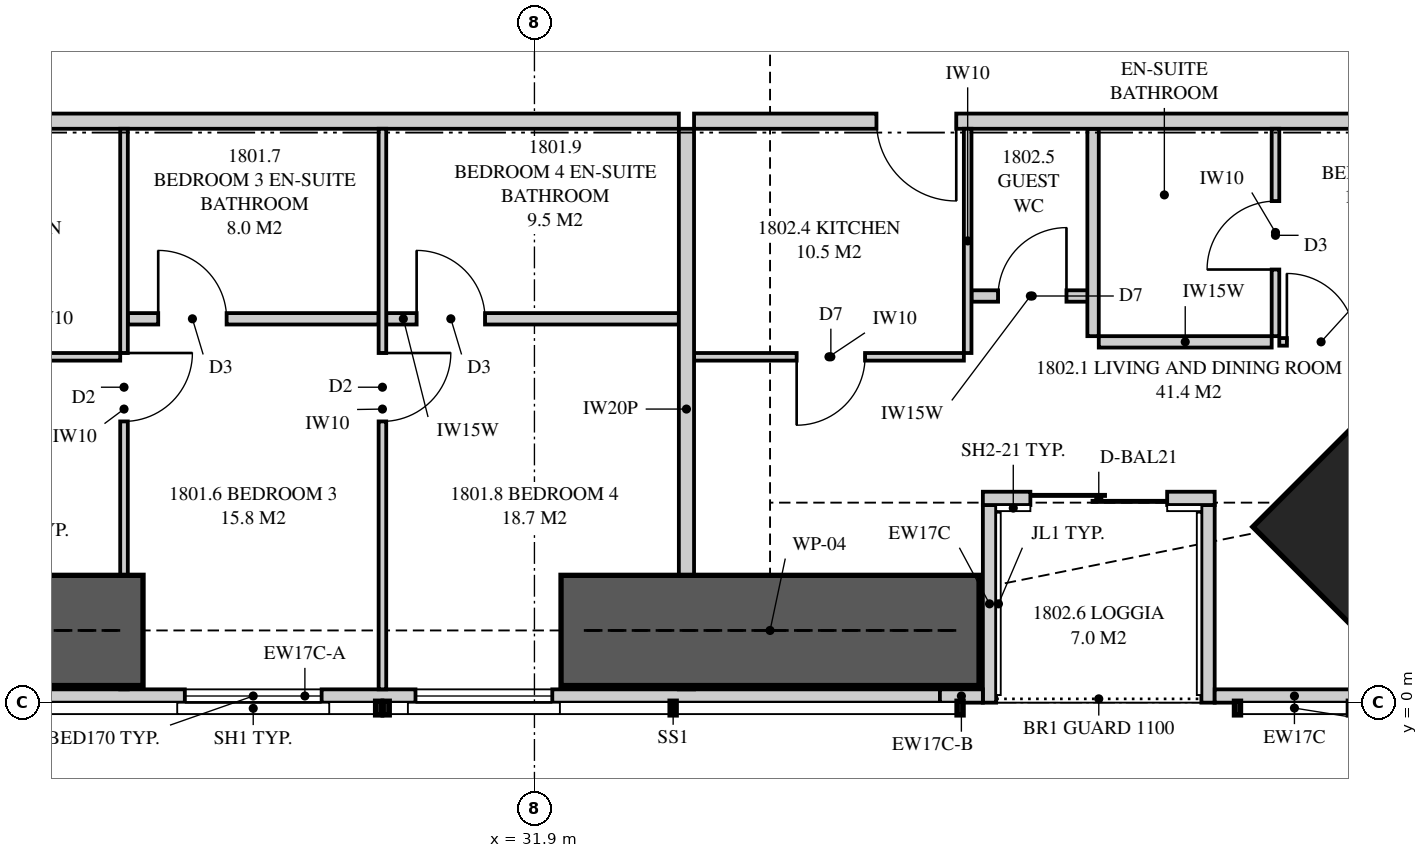
"""IFC4 building model, lengths in metres.
Left out: names, types, materials, properties, quantities, classifications, styles, units other than length and angle.
Written with IfcOpenShell. Run it as: python <this file> out.ifc"""

import sys

from ifc_helpers import new_model, si_unit, direction, frame, frame_2d, origin, origin_2d, place, context, subcontext, project, spatial, polyline, rectangle, hollow_rectangle, outline, extrude, element, fill, save


model = new_model("IFC4")
c1 = context("Model", 3, precision=1e-05, world=origin(), true_north=direction((0.0, 1.0)))
c2 = subcontext(c1, "Body", "Model", "MODEL_VIEW")
j1 = project(units=[si_unit("LENGTHUNIT", "METRE"), si_unit("PLANEANGLEUNIT", "RADIAN")], contexts=[c1])
p1 = place(None, origin())
s1 = spatial("IfcSite", under=j1, at=p1, CompositionType="ELEMENT")
p2 = place(p1, origin())
s2 = spatial("IfcBuilding", under=s1, at=p2, CompositionType="ELEMENT")
p3 = place(p2, frame((0.0, 0.0, 67.9)))
s3 = spatial("IfcBuildingStorey", under=s2, at=p3, CompositionType="ELEMENT", Elevation=67.9)
p4 = place(p3, frame((43.369, 2.631, 0.0), z_axis=(0.0, 0.0, 1.0), x_axis=(-0.707106781187, 0.707106781187, 0.0)))
e1 = element("IfcColumn", 1, at=p4, inside=s3, PredefinedType="COLUMN", context=c2, shape_type="SweptSolid", body=[
    extrude(hollow_rectangle(XDim=2.4, YDim=3.3, WallThickness=0.125, at=origin_2d()), origin(), (0.0, 0.0, 1.0), 3.35),
])
p5 = place(p3, frame((20.525, 0.087, 0.0), z_axis=(0.0, 0.0, 1.0), x_axis=(1.0, 0.0, 0.0)))
e2 = element("IfcWall", 2, at=p5, inside=s3, PredefinedType="SOLIDWALL", context=c2, shape_type="SweptSolid", body=[
    extrude(rectangle(XDim=16.71, YDim=0.175, at=frame_2d((8.355, 0.0))), origin(), (0.0, 0.0, 1.0), 2.15),
])
p6 = place(p5, frame((6.775, 0.0, 0.4)))
e3 = element("IfcOpeningElement", 3, at=p6, cuts=e2, PredefinedType="OPENING", context=c2, shape_type="SweptSolid", body=[
    extrude(rectangle(XDim=1.8, YDim=1.7, at=frame_2d((0.9, 0.85))), frame((0.0, 0.097, 0.0), z_axis=(0.0, -1.0, 0.0), x_axis=(1.0, 0.0, 0.0)), (0.0, 0.0, 1.0), 0.195),
])
p7 = place(p5, frame((9.81, 0.0, 0.4)))
e4 = element("IfcOpeningElement", 4, at=p7, cuts=e2, PredefinedType="OPENING", context=c2, shape_type="SweptSolid", body=[
    extrude(rectangle(XDim=1.8, YDim=1.7, at=frame_2d((0.9, 0.85))), frame((0.0, 0.097, 0.0), z_axis=(0.0, -1.0, 0.0), x_axis=(1.0, 0.0, 0.0)), (0.0, 0.0, 1.0), 0.195),
])
p8 = place(p3, frame((37.235, 0.087, 0.0), z_axis=(0.0, 0.0, 1.0), x_axis=(1.0, 0.0, 0.0)))
e5 = element("IfcWall", 5, at=p8, inside=s3, PredefinedType="SOLIDWALL", context=c2, shape_type="SweptSolid", body=[
    extrude(rectangle(XDim=0.565, YDim=0.175, at=frame_2d((0.283, 0.0))), origin(), (0.0, 0.0, 1.0), 3.11),
])
p9 = place(p3, frame((40.85, 0.087, 0.0), z_axis=(0.0, 0.0, 1.0), x_axis=(1.0, 0.0, 0.0)))
e6 = element("IfcWall", 6, at=p9, inside=s3, PredefinedType="SOLIDWALL", context=c2, shape_type="SweptSolid", body=[
    extrude(rectangle(XDim=2.099, YDim=0.175, at=frame_2d((1.049, 0.0))), origin(), (0.0, 0.0, 1.0), 3.11),
])
p10 = place(p3, frame((37.8, 2.688, 0.0), z_axis=(0.0, 0.0, 1.0), x_axis=(1.0, 0.0, 0.0)))
e7 = element("IfcWall", 7, at=p10, inside=s3, PredefinedType="SOLIDWALL", context=c2, shape_type="SweptSolid", body=[
    extrude(rectangle(XDim=3.05, YDim=0.175, at=frame_2d((1.525, 0.0))), origin(), (0.0, 0.0, 1.0), 2.15),
])
p11 = place(p10, frame((0.625, 0.0, 0.0)))
e8 = element("IfcOpeningElement", 8, at=p11, cuts=e7, PredefinedType="OPENING", context=c2, shape_type="SweptSolid", body=[
    extrude(rectangle(XDim=1.8, YDim=2.1, at=frame_2d((0.9, 1.05))), frame((0.0, 0.097, 0.0), z_axis=(0.0, -1.0, 0.0), x_axis=(1.0, 0.0, 0.0)), (0.0, 0.0, 1.0), 0.195),
])
p12 = place(p3, frame((37.887, 0.0, 0.0), z_axis=(0.0, 0.0, 1.0), x_axis=(0.0, 1.0, 0.0)))
e9 = element("IfcWall", 9, at=p12, inside=s3, PredefinedType="SOLIDWALL", context=c2, shape_type="SweptSolid", body=[
    extrude(outline(polyline([(0.0, 0.0), (2.6, 0.0), (2.6, 2.15), (0.289, 2.15), (0.289, 3.11), (0.0, 3.11), (0.0, 0.0)])), frame((0.0, 0.087, 0.0), z_axis=(0.0, -1.0, 0.0), x_axis=(1.0, 0.0, 0.0)), (0.0, 0.0, 1.0), 0.175),
])
p13 = place(p3, frame((40.762, 0.0, 0.0), z_axis=(0.0, 0.0, 1.0), x_axis=(0.0, 1.0, 0.0)))
e10 = element("IfcWall", 10, at=p13, inside=s3, PredefinedType="SOLIDWALL", context=c2, shape_type="SweptSolid", body=[
    extrude(outline(polyline([(0.0, 0.0), (2.6, 0.0), (2.6, 2.15), (0.866, 2.15), (0.866, 3.11), (0.0, 3.11), (0.0, 0.0)])), frame((0.0, 0.087, 0.0), z_axis=(0.0, -1.0, 0.0), x_axis=(1.0, 0.0, 0.0)), (0.0, 0.0, 1.0), 0.175),
])
p14 = place(p3, frame((33.9, 0.175, 0.0), z_axis=(0.0, 0.0, 1.0), x_axis=(0.0, 1.0, 0.0)))
e11 = element("IfcWall", 11, at=p14, inside=s3, PredefinedType="PARTITIONING", context=c2, shape_type="SweptSolid", body=[
    extrude(outline(polyline([(0.529, 2.15), (0.0, 2.15), (0.0, 0.0), (0.529, 0.0), (0.529, 0.752), (1.021, 0.752), (1.021, 0.0), (7.375, 0.0), (7.375, 3.11), (2.085, 3.11), (2.085, 2.15), (1.021, 2.15), (1.021, 1.398), (0.529, 1.398), (0.529, 2.15)])), frame((0.0, 0.1, 0.0), z_axis=(0.0, -1.0, 0.0), x_axis=(1.0, 0.0, 0.0)), (0.0, 0.0, 1.0), 0.2),
])
p15 = place(p3, frame((17.725, 7.65, 0.0), z_axis=(0.0, 0.0, 1.0), x_axis=(1.0, 0.0, 0.0)))
e12 = element("IfcWall", 12, at=p15, inside=s3, PredefinedType="PARTITIONING", context=c2, shape_type="SweptSolid", body=[
    extrude(outline(polyline([(0.0, 0.0), (16.075, 0.0), (16.075, 3.11), (6.612, 3.11), (6.612, 2.541), (5.938, 2.541), (5.938, 3.11), (0.0, 3.11), (0.0, 0.0)])), frame((0.0, 0.1, 0.0), z_axis=(0.0, -1.0, 0.0), x_axis=(1.0, 0.0, 0.0)), (0.0, 0.0, 1.0), 0.2),
])
p16 = place(p15, frame((0.2, 0.0, 0.0)))
e13 = element("IfcOpeningElement", 13, at=p16, cuts=e12, PredefinedType="OPENING", context=c2, shape_type="SweptSolid", body=[
    extrude(rectangle(XDim=1.05, YDim=2.2, at=frame_2d((0.525, 1.1))), frame((0.0, 0.11, 0.0), z_axis=(0.0, -1.0, 0.0), x_axis=(1.0, 0.0, 0.0)), (0.0, 0.0, 1.0), 0.22),
])
p17 = place(p3, frame((26.5, 0.175, 0.0), z_axis=(0.0, 0.0, 1.0), x_axis=(0.0, 1.0, 0.0)))
e14 = element("IfcWall", 14, at=p17, inside=s3, PredefinedType="PARTITIONING", context=c2, shape_type="SweptSolid", body=[
    extrude(outline(polyline([(0.0, 0.0), (7.375, 0.0), (7.375, 3.11), (2.035, 3.11), (2.035, 2.15), (0.0, 2.15), (0.0, 3.11), (0.0, 0.0)])), frame((0.0, 0.05, 0.0), z_axis=(0.0, -1.0, 0.0), x_axis=(1.0, 0.0, 0.0)), (0.0, 0.0, 1.0), 0.1),
])
p18 = place(p17, frame((3.525, 0.0, 0.0)))
e15 = element("IfcOpeningElement", 15, at=p18, cuts=e14, PredefinedType="OPENING", context=c2, shape_type="SweptSolid", body=[
    extrude(rectangle(XDim=0.9, YDim=2.1, at=frame_2d((0.45, 1.05))), frame((0.0, 0.06, 0.0), z_axis=(0.0, -1.0, 0.0), x_axis=(1.0, 0.0, 0.0)), (0.0, 0.0, 1.0), 0.12),
])
p19 = place(p3, frame((29.9, 0.175, 0.0), z_axis=(0.0, 0.0, 1.0), x_axis=(0.0, 1.0, 0.0)))
e16 = element("IfcWall", 16, at=p19, inside=s3, PredefinedType="PARTITIONING", context=c2, shape_type="SweptSolid", body=[
    extrude(outline(polyline([(0.0, 0.0), (7.375, 0.0), (7.375, 3.11), (2.035, 3.11), (2.035, 2.15), (0.0, 2.15), (0.0, 3.11), (0.0, 0.0)])), frame((0.0, 0.05, 0.0), z_axis=(0.0, -1.0, 0.0), x_axis=(1.0, 0.0, 0.0)), (0.0, 0.0, 1.0), 0.1),
])
p20 = place(p19, frame((3.525, 0.0, 0.0)))
e17 = element("IfcOpeningElement", 17, at=p20, cuts=e16, PredefinedType="OPENING", context=c2, shape_type="SweptSolid", body=[
    extrude(rectangle(XDim=0.9, YDim=2.1, at=frame_2d((0.45, 1.05))), frame((0.0, 0.06, 0.0), z_axis=(0.0, -1.0, 0.0), x_axis=(1.0, 0.0, 0.0)), (0.0, 0.0, 1.0), 0.12),
])
p21 = place(p3, frame((26.55, 5.05, 0.0), z_axis=(0.0, 0.0, 1.0), x_axis=(1.0, 0.0, 0.0)))
e18 = element("IfcWall", 18, at=p21, inside=s3, PredefinedType="PLUMBINGWALL", context=c2, shape_type="SweptSolid", body=[
    extrude(rectangle(XDim=3.3, YDim=0.15, at=frame_2d((1.65, 0.0))), origin(), (0.0, 0.0, 1.0), 3.11),
])
p22 = place(p21, frame((0.4, 0.0, 0.0)))
e19 = element("IfcOpeningElement", 19, at=p22, cuts=e18, PredefinedType="OPENING", context=c2, shape_type="SweptSolid", body=[
    extrude(rectangle(XDim=0.9, YDim=2.1, at=frame_2d((0.45, 1.05))), frame((0.0, 0.085, 0.0), z_axis=(0.0, -1.0, 0.0), x_axis=(1.0, 0.0, 0.0)), (0.0, 0.0, 1.0), 0.17),
])
p23 = place(p3, frame((29.95, 5.05, 0.0), z_axis=(0.0, 0.0, 1.0), x_axis=(1.0, 0.0, 0.0)))
e20 = element("IfcWall", 20, at=p23, inside=s3, PredefinedType="PLUMBINGWALL", context=c2, shape_type="SweptSolid", body=[
    extrude(rectangle(XDim=3.85, YDim=0.15, at=frame_2d((1.925, 0.0))), origin(), (0.0, 0.0, 1.0), 3.11),
])
p24 = place(p23, frame((0.4, 0.0, 0.0)))
e21 = element("IfcOpeningElement", 21, at=p24, cuts=e20, PredefinedType="OPENING", context=c2, shape_type="SweptSolid", body=[
    extrude(rectangle(XDim=0.9, YDim=2.1, at=frame_2d((0.45, 1.05))), frame((0.0, 0.085, 0.0), z_axis=(0.0, -1.0, 0.0), x_axis=(1.0, 0.0, 0.0)), (0.0, 0.0, 1.0), 0.17),
])
p25 = place(p3, frame((22.9, 4.55, 0.0), z_axis=(0.0, 0.0, 1.0), x_axis=(1.0, 0.0, 0.0)))
e22 = element("IfcWall", 22, at=p25, inside=s3, PredefinedType="PARTITIONING", context=c2, shape_type="SweptSolid", body=[
    extrude(outline(polyline([(0.0, 0.0), (3.55, 0.0), (3.55, 3.11), (1.387, 3.11), (1.387, 2.541), (0.812, 2.541), (0.812, 3.11), (0.0, 3.11), (0.0, 0.0)])), frame((0.0, 0.05, 0.0), z_axis=(0.0, -1.0, 0.0), x_axis=(1.0, 0.0, 0.0)), (0.0, 0.0, 1.0), 0.1),
])
p26 = place(p25, frame((1.3, 0.0, 0.0)))
e23 = element("IfcOpeningElement", 23, at=p26, cuts=e22, PredefinedType="OPENING", context=c2, shape_type="SweptSolid", body=[
    extrude(rectangle(XDim=0.9, YDim=2.1, at=frame_2d((0.45, 1.05))), frame((0.0, 0.06, 0.0), z_axis=(0.0, -1.0, 0.0), x_axis=(1.0, 0.0, 0.0)), (0.0, 0.0, 1.0), 0.12),
])
p27 = place(p3, frame((34.0, 7.65, 0.0), z_axis=(0.0, 0.0, 1.0), x_axis=(1.0, 0.0, 0.0)))
e24 = element("IfcWall", 24, at=p27, inside=s3, PredefinedType="PARTITIONING", context=c2, shape_type="SweptSolid", body=[
    extrude(outline(polyline([(0.0, 0.0), (12.0, 0.0), (12.0, 3.11), (11.51, 3.11), (11.51, 2.15), (8.855, 2.15), (8.855, 3.11), (1.337, 3.11), (1.337, 2.541), (0.663, 2.541), (0.663, 3.11), (0.0, 3.11), (0.0, 0.0)])), frame((0.0, 0.1, 0.0), z_axis=(0.0, -1.0, 0.0), x_axis=(1.0, 0.0, 0.0)), (0.0, 0.0, 1.0), 0.2),
])
p28 = place(p27, frame((2.4, 0.0, 0.0)))
e25 = element("IfcOpeningElement", 25, at=p28, cuts=e24, PredefinedType="OPENING", context=c2, shape_type="SweptSolid", body=[
    extrude(rectangle(XDim=1.05, YDim=2.2, at=frame_2d((0.525, 1.1))), frame((0.0, 0.11, 0.0), z_axis=(0.0, -1.0, 0.0), x_axis=(1.0, 0.0, 0.0)), (0.0, 0.0, 1.0), 0.22),
])
p29 = place(p3, frame((41.65, 4.822, 0.0), z_axis=(0.0, 0.0, 1.0), x_axis=(0.0, 1.0, 0.0)))
e26 = element("IfcWall", 26, at=p29, inside=s3, PredefinedType="PARTITIONING", context=c2, shape_type="SweptSolid", body=[
    extrude(rectangle(XDim=2.728, YDim=0.1, at=frame_2d((1.364, 0.0))), origin(), (0.0, 0.0, 1.0), 3.11),
])
p30 = place(p29, frame((0.877, 0.0, 0.0)))
e27 = element("IfcOpeningElement", 27, at=p30, cuts=e26, PredefinedType="OPENING", context=c2, shape_type="SweptSolid", body=[
    extrude(rectangle(XDim=0.9, YDim=2.1, at=frame_2d((0.45, 1.05))), frame((0.0, 0.06, 0.0), z_axis=(0.0, -1.0, 0.0), x_axis=(1.0, 0.0, 0.0)), (0.0, 0.0, 1.0), 0.12),
])
p31 = place(p3, frame((41.7, 4.747, 0.0), z_axis=(0.0, 0.0, 1.0), x_axis=(1.0, 0.0, 0.0)))
e28 = element("IfcWall", 28, at=p31, inside=s3, PredefinedType="PARTITIONING", context=c2, shape_type="SweptSolid", body=[
    extrude(outline(polyline([(0.0, 0.0), (4.3, 0.0), (4.3, 3.11), (3.288, 3.11), (3.288, 2.15), (0.735, 2.15), (0.735, 3.11), (0.0, 3.11), (0.0, 0.0)])), frame((0.0, 0.05, 0.0), z_axis=(0.0, -1.0, 0.0), x_axis=(1.0, 0.0, 0.0)), (0.0, 0.0, 1.0), 0.1),
])
p32 = place(p31, frame((0.1, 0.0, 0.0)))
e29 = element("IfcOpeningElement", 29, at=p32, cuts=e28, PredefinedType="OPENING", context=c2, shape_type="SweptSolid", body=[
    extrude(rectangle(XDim=0.9, YDim=2.1, at=frame_2d((0.45, 1.05))), frame((0.0, 0.06, 0.0), z_axis=(0.0, -1.0, 0.0), x_axis=(1.0, 0.0, 0.0)), (0.0, 0.0, 1.0), 0.12),
])
p33 = place(p3, frame((39.325, 4.747, 0.0), z_axis=(0.0, 0.0, 1.0), x_axis=(1.0, 0.0, 0.0)))
e30 = element("IfcWall", 30, at=p33, inside=s3, PredefinedType="PLUMBINGWALL", context=c2, shape_type="SweptSolid", body=[
    extrude(rectangle(XDim=2.275, YDim=0.15, at=frame_2d((1.138, 0.0))), origin(), (0.0, 0.0, 1.0), 3.11),
])
p34 = place(p3, frame((39.25, 4.822, 0.0), z_axis=(0.0, 0.0, 1.0), x_axis=(0.0, 1.0, 0.0)))
e31 = element("IfcWall", 31, at=p34, inside=s3, PredefinedType="PLUMBINGWALL", context=c2, shape_type="SweptSolid", body=[
    extrude(rectangle(XDim=2.728, YDim=0.15, at=frame_2d((1.364, 0.0))), origin(), (0.0, 0.0, 1.0), 3.11),
])
p35 = place(p3, frame((34.0, 4.55, 0.0), z_axis=(0.0, 0.0, 1.0), x_axis=(1.0, 0.0, 0.0)))
e32 = element("IfcWall", 32, at=p35, inside=s3, PredefinedType="PARTITIONING", context=c2, shape_type="SweptSolid", body=[
    extrude(outline(polyline([(0.0, 0.0), (3.55, 0.0), (3.55, 3.11), (1.287, 3.11), (1.287, 2.541), (0.713, 2.541), (0.713, 3.11), (0.0, 3.11), (0.0, 0.0)])), frame((0.0, 0.05, 0.0), z_axis=(0.0, -1.0, 0.0), x_axis=(1.0, 0.0, 0.0)), (0.0, 0.0, 1.0), 0.1),
])
p36 = place(p35, frame((1.35, 0.0, 0.0)))
e33 = element("IfcOpeningElement", 33, at=p36, cuts=e32, PredefinedType="OPENING", context=c2, shape_type="SweptSolid", body=[
    extrude(rectangle(XDim=0.9, YDim=2.1, at=frame_2d((0.45, 1.05))), frame((0.0, 0.06, 0.0), z_axis=(0.0, -1.0, 0.0), x_axis=(1.0, 0.0, 0.0)), (0.0, 0.0, 1.0), 0.12),
])
p37 = place(p3, frame((37.6, 4.6, 0.0), z_axis=(0.0, 0.0, 1.0), x_axis=(0.0, 1.0, 0.0)))
e34 = element("IfcWall", 34, at=p37, inside=s3, PredefinedType="PARTITIONING", context=c2, shape_type="SweptSolid", body=[
    extrude(rectangle(XDim=2.95, YDim=0.1, at=frame_2d((1.475, 0.0))), origin(), (0.0, 0.0, 1.0), 3.11),
])
p38 = place(p3, frame((37.65, 5.35, 0.0), z_axis=(0.0, 0.0, 1.0), x_axis=(1.0, 0.0, 0.0)))
e35 = element("IfcWall", 35, at=p38, inside=s3, PredefinedType="PLUMBINGWALL", context=c2, shape_type="SweptSolid", body=[
    extrude(rectangle(XDim=1.55, YDim=0.15, at=frame_2d((0.775, 0.0))), origin(), (0.0, 0.0, 1.0), 3.11),
])
p39 = place(p38, frame((0.35, 0.0, 0.0)))
e36 = element("IfcOpeningElement", 36, at=p39, cuts=e35, PredefinedType="OPENING", context=c2, shape_type="SweptSolid", body=[
    extrude(rectangle(XDim=0.9, YDim=2.1, at=frame_2d((0.45, 1.05))), frame((0.0, 0.085, 0.0), z_axis=(0.0, -1.0, 0.0), x_axis=(1.0, 0.0, 0.0)), (0.0, 0.0, 1.0), 0.17),
])
for number, where, z_axis, x_axis in (
    (37, (21.25, 0.95, 0.0), (0.0, 0.0, 1.0), (1.0, 0.0, 0.0)),
    (38, (32.25, 0.95, 0.0), (0.0, 0.0, 1.0), (1.0, 0.0, 0.0)),
):
    element("IfcWall", number, at=place(p3, frame(where, z_axis=z_axis, x_axis=x_axis)), inside=s3, PredefinedType="SHEAR", context=c2, shape_type="SweptSolid", body=[
        extrude(rectangle(XDim=5.5, YDim=1.45, at=frame_2d((2.75, 0.0))), origin(), (0.0, 0.0, 1.0), 3.35),
    ])
p40 = place(p6, origin())
e39 = element("IfcWindow", 39, at=p40, inside=s3, PartitioningType="SINGLE_PANEL", PredefinedType="WINDOW", context=c2, shape_type="SweptSolid", body=[
    extrude(rectangle(XDim=1.8, YDim=1.7, at=frame_2d((0.9, 0.85))), frame((0.0, 0.03, 0.0), z_axis=(0.0, -1.0, 0.0), x_axis=(1.0, 0.0, 0.0)), (0.0, 0.0, 1.0), 0.06),
])
fill(e3, e39)
p41 = place(p7, origin())
e40 = element("IfcWindow", 40, at=p41, inside=s3, PartitioningType="SINGLE_PANEL", PredefinedType="WINDOW", context=c2, shape_type="SweptSolid", body=[
    extrude(rectangle(XDim=1.8, YDim=1.7, at=frame_2d((0.9, 0.85))), frame((0.0, 0.03, 0.0), z_axis=(0.0, -1.0, 0.0), x_axis=(1.0, 0.0, 0.0)), (0.0, 0.0, 1.0), 0.06),
])
fill(e4, e40)
p42 = place(p11, origin())
e41 = element("IfcDoor", 41, at=p42, inside=s3, OperationType="SLIDING_TO_LEFT", PredefinedType="DOOR", context=c2, shape_type="SweptSolid", body=[
    extrude(rectangle(XDim=1.8, YDim=2.1, at=frame_2d((0.9, 1.05))), frame((0.0, 0.025, 0.0), z_axis=(0.0, -1.0, 0.0), x_axis=(1.0, 0.0, 0.0)), (0.0, 0.0, 1.0), 0.05),
])
fill(e8, e41)
p43 = place(p18, frame((0.9, 0.0, 0.0), z_axis=(0.0, 0.0, 1.0), x_axis=(-1.0, 0.0, 0.0)))
e42 = element("IfcDoor", 42, at=p43, inside=s3, OperationType="SINGLE_SWING_LEFT", PredefinedType="DOOR", context=c2, shape_type="SweptSolid", body=[
    extrude(rectangle(XDim=0.9, YDim=2.1, at=frame_2d((0.45, 1.05))), frame((0.0, 0.025, 0.0), z_axis=(0.0, -1.0, 0.0), x_axis=(1.0, 0.0, 0.0)), (0.0, 0.0, 1.0), 0.05),
])
fill(e15, e42)
p44 = place(p22, origin())
e43 = element("IfcDoor", 43, at=p44, inside=s3, OperationType="SINGLE_SWING_LEFT", PredefinedType="DOOR", context=c2, shape_type="SweptSolid", body=[
    extrude(rectangle(XDim=0.9, YDim=2.1, at=frame_2d((0.45, 1.05))), frame((0.0, 0.025, 0.0), z_axis=(0.0, -1.0, 0.0), x_axis=(1.0, 0.0, 0.0)), (0.0, 0.0, 1.0), 0.05),
])
fill(e19, e43)
p45 = place(p20, frame((0.9, 0.0, 0.0), z_axis=(0.0, 0.0, 1.0), x_axis=(-1.0, 0.0, 0.0)))
e44 = element("IfcDoor", 44, at=p45, inside=s3, OperationType="SINGLE_SWING_LEFT", PredefinedType="DOOR", context=c2, shape_type="SweptSolid", body=[
    extrude(rectangle(XDim=0.9, YDim=2.1, at=frame_2d((0.45, 1.05))), frame((0.0, 0.025, 0.0), z_axis=(0.0, -1.0, 0.0), x_axis=(1.0, 0.0, 0.0)), (0.0, 0.0, 1.0), 0.05),
])
fill(e17, e44)
p46 = place(p24, origin())
e45 = element("IfcDoor", 45, at=p46, inside=s3, OperationType="SINGLE_SWING_LEFT", PredefinedType="DOOR", context=c2, shape_type="SweptSolid", body=[
    extrude(rectangle(XDim=0.9, YDim=2.1, at=frame_2d((0.45, 1.05))), frame((0.0, 0.025, 0.0), z_axis=(0.0, -1.0, 0.0), x_axis=(1.0, 0.0, 0.0)), (0.0, 0.0, 1.0), 0.05),
])
fill(e21, e45)
p47 = place(p28, frame((1.05, 0.0, 0.0), z_axis=(0.0, 0.0, 1.0), x_axis=(-1.0, 0.0, 0.0)))
e46 = element("IfcDoor", 46, at=p47, inside=s3, OperationType="SINGLE_SWING_LEFT", PredefinedType="DOOR", context=c2, shape_type="SweptSolid", body=[
    extrude(rectangle(XDim=1.05, YDim=2.2, at=frame_2d((0.525, 1.1))), frame((0.0, 0.025, 0.0), z_axis=(0.0, -1.0, 0.0), x_axis=(1.0, 0.0, 0.0)), (0.0, 0.0, 1.0), 0.05),
])
fill(e25, e46)
p48 = place(p32, origin())
e47 = element("IfcDoor", 47, at=p48, inside=s3, OperationType="SINGLE_SWING_LEFT", PredefinedType="DOOR", context=c2, shape_type="SweptSolid", body=[
    extrude(rectangle(XDim=0.9, YDim=2.1, at=frame_2d((0.45, 1.05))), frame((0.0, 0.025, 0.0), z_axis=(0.0, -1.0, 0.0), x_axis=(1.0, 0.0, 0.0)), (0.0, 0.0, 1.0), 0.05),
])
fill(e29, e47)
p49 = place(p30, origin())
e48 = element("IfcDoor", 48, at=p49, inside=s3, OperationType="SINGLE_SWING_LEFT", PredefinedType="DOOR", context=c2, shape_type="SweptSolid", body=[
    extrude(rectangle(XDim=0.9, YDim=2.1, at=frame_2d((0.45, 1.05))), frame((0.0, 0.025, 0.0), z_axis=(0.0, -1.0, 0.0), x_axis=(1.0, 0.0, 0.0)), (0.0, 0.0, 1.0), 0.05),
])
fill(e27, e48)
p50 = place(p36, frame((0.9, 0.0, 0.0), z_axis=(0.0, 0.0, 1.0), x_axis=(-1.0, 0.0, 0.0)))
e49 = element("IfcDoor", 49, at=p50, inside=s3, OperationType="SINGLE_SWING_RIGHT", PredefinedType="DOOR", context=c2, shape_type="SweptSolid", body=[
    extrude(rectangle(XDim=0.9, YDim=2.1, at=frame_2d((0.45, 1.05))), frame((0.0, 0.025, 0.0), z_axis=(0.0, -1.0, 0.0), x_axis=(1.0, 0.0, 0.0)), (0.0, 0.0, 1.0), 0.05),
])
fill(e33, e49)
p51 = place(p39, origin())
e50 = element("IfcDoor", 50, at=p51, inside=s3, OperationType="SINGLE_SWING_RIGHT", PredefinedType="DOOR", context=c2, shape_type="SweptSolid", body=[
    extrude(rectangle(XDim=0.9, YDim=2.1, at=frame_2d((0.45, 1.05))), frame((0.0, 0.025, 0.0), z_axis=(0.0, -1.0, 0.0), x_axis=(1.0, 0.0, 0.0)), (0.0, 0.0, 1.0), 0.05),
])
fill(e36, e50)
save(model, sys.argv[1])
